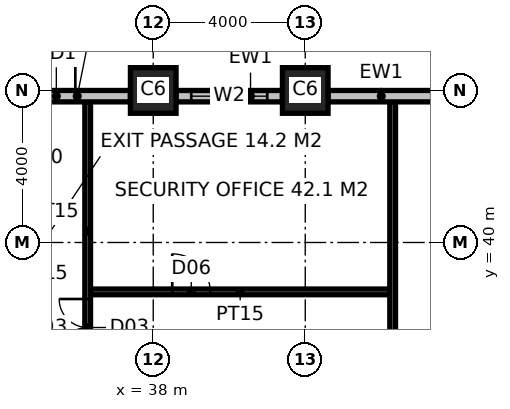
"""IFC4 building model, lengths in metres.
Left out: names, types, materials, properties, quantities, classifications, styles, units other than length and angle.
Written with IfcOpenShell. Run it as: python <this file> out.ifc"""

import sys

from ifc_helpers import new_model, si_unit, direction, frame, frame_2d, origin, origin_2d, place, context, subcontext, project, spatial, rectangle, hollow_rectangle, extrude, element, fill, save


model = new_model("IFC4")
c1 = context("Model", 3, precision=1e-05, world=origin(), true_north=direction((0.0, 1.0)))
c2 = subcontext(c1, "Body", "Model", "MODEL_VIEW")
j1 = project(units=[si_unit("LENGTHUNIT", "METRE"), si_unit("PLANEANGLEUNIT", "RADIAN")], contexts=[c1])
p1 = place(None, origin())
s1 = spatial("IfcSite", under=j1, at=p1, CompositionType="ELEMENT")
p2 = place(p1, origin())
s2 = spatial("IfcBuilding", under=s1, at=p2, CompositionType="ELEMENT")
p3 = place(p2, origin())
s3 = spatial("IfcBuildingStorey", under=s2, at=p3, CompositionType="ELEMENT", Elevation=0.0)
for number, where, z_axis, x_axis in (
    (1, (38.0, 44.0, -0.3), (0.0, 0.0, 1.0), (1.0, 0.0, 0.0)),
    (2, (42.0, 44.0, -0.3), (0.0, 0.0, 1.0), (1.0, 0.0, 0.0)),
):
    element("IfcColumn", number, at=place(p3, frame(where, z_axis=z_axis, x_axis=x_axis)), inside=s3, PredefinedType="COLUMN", context=c2, shape_type="SweptSolid", body=[
        extrude(hollow_rectangle(XDim=1.2, YDim=1.2, WallThickness=0.125, at=origin_2d()), origin(), (0.0, 0.0, 1.0), 6.3),
    ])
p4 = place(p3, frame((36.35, 38.7, 0.0), z_axis=(0.0, 0.0, 1.0), x_axis=(1.0, 0.0, 0.0)))
e3 = element("IfcWall", 3, at=p4, inside=s3, PredefinedType="PARTITIONING", context=c2, shape_type="SweptSolid", body=[
    extrude(rectangle(XDim=7.875, YDim=0.15, at=frame_2d((3.938, 0.0))), origin(), (0.0, 0.0, 1.0), 5.85),
])
p5 = place(p4, frame((2.15, 0.0, 0.0)))
e4 = element("IfcOpeningElement", 4, at=p5, cuts=e3, PredefinedType="OPENING", context=c2, shape_type="SweptSolid", body=[
    extrude(rectangle(XDim=1.0, YDim=2.2, at=frame_2d((0.5, 1.1))), frame((0.0, 0.085, 0.0), z_axis=(0.0, -1.0, 0.0), x_axis=(1.0, 0.0, 0.0)), (0.0, 0.0, 1.0), 0.17),
])
p6 = place(p3, frame((36.275, 36.9, 0.0), z_axis=(0.0, 0.0, 1.0), x_axis=(0.0, 1.0, 0.0)))
e5 = element("IfcWall", 5, at=p6, inside=s3, PredefinedType="PARTITIONING", context=c2, shape_type="SweptSolid", body=[
    extrude(rectangle(XDim=6.8, YDim=0.15, at=frame_2d((3.4, 0.0))), origin(), (0.0, 0.0, 1.0), 5.85),
])
p7 = place(p6, frame((0.113, 0.0, 0.0)))
e6 = element("IfcOpeningElement", 6, at=p7, cuts=e5, PredefinedType="OPENING", context=c2, shape_type="SweptSolid", body=[
    extrude(rectangle(XDim=1.5, YDim=2.4, at=frame_2d((0.75, 1.2))), frame((0.0, 0.085, 0.0), z_axis=(0.0, -1.0, 0.0), x_axis=(1.0, 0.0, 0.0)), (0.0, 0.0, 1.0), 0.17),
])
p8 = place(p3, frame((44.3, 15.225, 0.0), z_axis=(0.0, 0.0, 1.0), x_axis=(0.0, 1.0, 0.0)))
e7 = element("IfcWall", 7, at=p8, inside=s3, PredefinedType="PARTITIONING", context=c2, shape_type="SweptSolid", body=[
    extrude(rectangle(XDim=28.475, YDim=0.15, at=frame_2d((14.237, 0.0))), origin(), (0.0, 0.0, 1.0), 5.85),
])
p9 = place(p8, frame((2.875, 0.0, 0.0)))
e8 = element("IfcOpeningElement", 8, at=p9, cuts=e7, PredefinedType="OPENING", context=c2, shape_type="SweptSolid", body=[
    extrude(rectangle(XDim=1.0, YDim=2.2, at=frame_2d((0.5, 1.1))), frame((0.0, 0.085, 0.0), z_axis=(0.0, -1.0, 0.0), x_axis=(1.0, 0.0, 0.0)), (0.0, 0.0, 1.0), 0.17),
])
p10 = place(p8, frame((13.875, 0.0, 0.0)))
e9 = element("IfcOpeningElement", 9, at=p10, cuts=e7, PredefinedType="OPENING", context=c2, shape_type="SweptSolid", body=[
    extrude(rectangle(XDim=1.8, YDim=2.7, at=frame_2d((0.9, 1.35))), frame((0.0, 0.085, 0.0), z_axis=(0.0, -1.0, 0.0), x_axis=(1.0, 0.0, 0.0)), (0.0, 0.0, 1.0), 0.17),
])
p11 = place(p3, frame((37.4, 43.85, 0.0), z_axis=(0.0, 0.0, 1.0), x_axis=(-1.0, 0.0, 0.0)))
e10 = element("IfcWall", 10, at=p11, inside=s3, PredefinedType="ELEMENTEDWALL", context=c2, shape_type="SweptSolid", body=[
    extrude(rectangle(XDim=2.8, YDim=0.3, at=frame_2d((1.4, 0.0))), origin(), (0.0, 0.0, 1.0), 4.95),
])
p12 = place(p11, frame((1.45, 0.0, 0.0)))
e11 = element("IfcOpeningElement", 11, at=p12, cuts=e10, PredefinedType="OPENING", context=c2, shape_type="SweptSolid", body=[
    extrude(rectangle(XDim=1.0, YDim=2.4, at=frame_2d((0.5, 1.2))), frame((0.0, 0.16, 0.0), z_axis=(0.0, -1.0, 0.0), x_axis=(1.0, 0.0, 0.0)), (0.0, 0.0, 1.0), 0.32),
])
p13 = place(p3, frame((41.4, 43.85, 0.0), z_axis=(0.0, 0.0, 1.0), x_axis=(-1.0, 0.0, 0.0)))
e12 = element("IfcWall", 12, at=p13, inside=s3, PredefinedType="ELEMENTEDWALL", context=c2, shape_type="SweptSolid", body=[
    extrude(rectangle(XDim=2.8, YDim=0.3, at=frame_2d((1.4, 0.0))), origin(), (0.0, 0.0, 1.0), 4.95),
])
p14 = place(p13, frame((0.4, 0.0, 1.2)))
e13 = element("IfcOpeningElement", 13, at=p14, cuts=e12, PredefinedType="OPENING", context=c2, shape_type="SweptSolid", body=[
    extrude(rectangle(XDim=2.0, YDim=3.6, at=frame_2d((1.0, 1.8))), frame((0.0, 0.16, 0.0), z_axis=(0.0, -1.0, 0.0), x_axis=(1.0, 0.0, 0.0)), (0.0, 0.0, 1.0), 0.32),
])
p15 = place(p3, frame((45.4, 43.85, 0.0), z_axis=(0.0, 0.0, 1.0), x_axis=(-1.0, 0.0, 0.0)))
e14 = element("IfcWall", 14, at=p15, inside=s3, PredefinedType="ELEMENTEDWALL", context=c2, shape_type="SweptSolid", body=[
    extrude(rectangle(XDim=2.8, YDim=0.3, at=frame_2d((1.4, 0.0))), origin(), (0.0, 0.0, 1.0), 4.95),
])
p16 = place(p7, origin())
e15 = element("IfcDoor", 15, at=p16, inside=s3, OperationType="DOUBLE_DOOR_DOUBLE_SWING", PredefinedType="DOOR", context=c2, shape_type="SweptSolid", body=[
    extrude(rectangle(XDim=1.5, YDim=2.4, at=frame_2d((0.75, 1.2))), frame((0.0, 0.025, 0.0), z_axis=(0.0, -1.0, 0.0), x_axis=(1.0, 0.0, 0.0)), (0.0, 0.0, 1.0), 0.05),
])
fill(e6, e15)
p17 = place(p5, origin())
e16 = element("IfcDoor", 16, at=p17, inside=s3, OperationType="SINGLE_SWING_LEFT", PredefinedType="DOOR", context=c2, shape_type="SweptSolid", body=[
    extrude(rectangle(XDim=1.0, YDim=2.2, at=frame_2d((0.5, 1.1))), frame((0.0, 0.025, 0.0), z_axis=(0.0, -1.0, 0.0), x_axis=(1.0, 0.0, 0.0)), (0.0, 0.0, 1.0), 0.05),
])
fill(e4, e16)
p18 = place(p12, frame((1.0, 0.0, 0.0), z_axis=(0.0, 0.0, 1.0), x_axis=(-1.0, 0.0, 0.0)))
e17 = element("IfcDoor", 17, at=p18, inside=s3, OperationType="SINGLE_SWING_RIGHT", PredefinedType="DOOR", context=c2, shape_type="SweptSolid", body=[
    extrude(rectangle(XDim=1.0, YDim=2.4, at=frame_2d((0.5, 1.2))), frame((0.0, 0.025, 0.0), z_axis=(0.0, -1.0, 0.0), x_axis=(1.0, 0.0, 0.0)), (0.0, 0.0, 1.0), 0.05),
])
fill(e11, e17)
p19 = place(p14, origin())
e18 = element("IfcWindow", 18, at=p19, inside=s3, PartitioningType="SINGLE_PANEL", PredefinedType="WINDOW", context=c2, shape_type="SweptSolid", body=[
    extrude(rectangle(XDim=2.0, YDim=3.6, at=frame_2d((1.0, 1.8))), frame((0.0, 0.03, 0.0), z_axis=(0.0, -1.0, 0.0), x_axis=(1.0, 0.0, 0.0)), (0.0, 0.0, 1.0), 0.06),
])
fill(e13, e18)
save(model, sys.argv[1])
